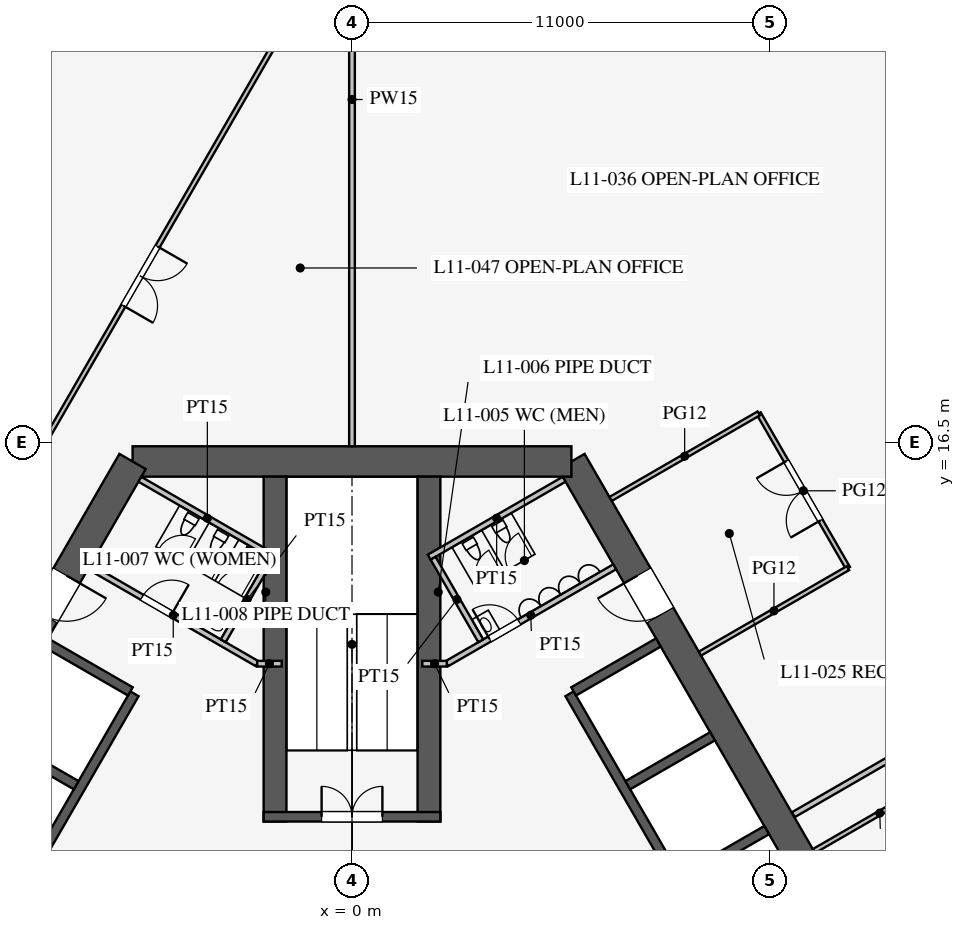
"""IFC4 building model, lengths in metres.
Left out: names, types, materials, properties, quantities, classifications, styles, units other than length and angle.
Written with IfcOpenShell. Run it as: python <this file> out.ifc"""

import sys

from ifc_helpers import new_model, si_unit, direction, frame, frame_2d, origin, place, context, subcontext, project, spatial, rectangle, extrude, element, fill, save


model = new_model("IFC4")
c1 = context("Model", 3, precision=1e-05, world=origin(), true_north=direction((0.0, 1.0)))
c2 = subcontext(c1, "Body", "Model", "MODEL_VIEW")
j1 = project(units=[si_unit("LENGTHUNIT", "METRE"), si_unit("PLANEANGLEUNIT", "RADIAN")], contexts=[c1])
p1 = place(None, origin())
s1 = spatial("IfcSite", under=j1, at=p1, CompositionType="ELEMENT")
p2 = place(p1, origin())
s2 = spatial("IfcBuilding", under=s1, at=p2, CompositionType="ELEMENT")
p3 = place(p2, frame((0.0, 0.0, 50.1)))
s3 = spatial("IfcBuildingStorey", under=s2, at=p3, CompositionType="ELEMENT", Elevation=50.1)
p4 = place(p3, frame((16.743, -3.0, 0.0), z_axis=(0.0, 0.0, 1.0), x_axis=(-0.500002442456, 0.866023993627, 0.0)))
e1 = element("IfcWall", 1, at=p4, inside=s3, PredefinedType="SHEAR", context=c2, shape_type="SweptSolid", body=[
    extrude(rectangle(XDim=21.939, YDim=0.8, at=frame_2d((10.97, 0.0))), origin(), (0.0, 0.0, 1.0), 4.2),
])
p5 = place(p4, frame((17.27, 0.0, 0.0)))
e2 = element("IfcOpeningElement", 2, at=p5, cuts=e1, PredefinedType="OPENING", context=c2, shape_type="SweptSolid", body=[
    extrude(rectangle(XDim=1.2, YDim=2.1, at=frame_2d((0.6, 1.05))), frame((0.0, 0.41, 0.0), z_axis=(0.0, -1.0, 0.0), x_axis=(1.0, 0.0, 0.0)), (0.0, 0.0, 1.0), 0.82),
])
p6 = place(p4, frame((3.47, 0.0, 0.0)))
e3 = element("IfcOpeningElement", 3, at=p6, cuts=e1, PredefinedType="OPENING", context=c2, shape_type="SweptSolid", body=[
    extrude(rectangle(XDim=1.2, YDim=2.1, at=frame_2d((0.6, 1.05))), frame((0.0, 0.41, 0.0), z_axis=(0.0, -1.0, 0.0), x_axis=(1.0, 0.0, 0.0)), (0.0, 0.0, 1.0), 0.82),
])
p7 = place(p3, frame((5.773, 16.0, 0.0), z_axis=(0.0, 0.0, 1.0), x_axis=(-1.0, 0.0, 0.0)))
e4 = element("IfcWall", 4, at=p7, inside=s3, PredefinedType="SHEAR", context=c2, shape_type="SweptSolid", body=[
    extrude(rectangle(XDim=11.547, YDim=0.8, at=frame_2d((5.773, 0.0))), origin(), (0.0, 0.0, 1.0), 4.2),
])
p8 = place(p3, frame((-5.773, 16.0, 0.0), z_axis=(0.0, 0.0, 1.0), x_axis=(-0.500002442456, -0.866023993627, 0.0)))
e5 = element("IfcWall", 5, at=p8, inside=s3, PredefinedType="SHEAR", context=c2, shape_type="SweptSolid", body=[
    extrude(rectangle(XDim=21.939, YDim=0.8, at=frame_2d((10.97, 0.0))), origin(), (0.0, 0.0, 1.0), 4.2),
])
p9 = place(p8, frame((17.27, 0.0, 0.0)))
e6 = element("IfcOpeningElement", 6, at=p9, cuts=e5, PredefinedType="OPENING", context=c2, shape_type="SweptSolid", body=[
    extrude(rectangle(XDim=1.2, YDim=2.1, at=frame_2d((0.6, 1.05))), frame((0.0, 0.41, 0.0), z_axis=(0.0, -1.0, 0.0), x_axis=(1.0, 0.0, 0.0)), (0.0, 0.0, 1.0), 0.82),
])
p10 = place(p8, frame((3.47, 0.0, 0.0)))
e7 = element("IfcOpeningElement", 7, at=p10, cuts=e5, PredefinedType="OPENING", context=c2, shape_type="SweptSolid", body=[
    extrude(rectangle(XDim=1.2, YDim=2.1, at=frame_2d((0.6, 1.05))), frame((0.0, 0.41, 0.0), z_axis=(0.0, -1.0, 0.0), x_axis=(1.0, 0.0, 0.0)), (0.0, 0.0, 1.0), 0.82),
])
p11 = place(p3, frame((11.424, 0.014, 0.0), z_axis=(0.0, 0.0, 1.0), x_axis=(-0.500001763848, 0.866024385424, 0.0)))
e8 = element("IfcWall", 8, at=p11, inside=s3, PredefinedType="SHEAR", context=c2, shape_type="SweptSolid", body=[
    extrude(rectangle(XDim=11.4, YDim=0.25, at=frame_2d((5.7, 0.0))), origin(), (0.0, 0.0, 1.0), 4.2),
])
for number, where, z_axis, x_axis in (
    (9, (8.682, 5.012, 0.0), (0.0, 0.0, 1.0), (0.866, 0.5, 0.0)),
    (10, (7.257, 7.481, 0.0), (0.0, 0.0, 1.0), (0.866, 0.5, 0.0)),
):
    element("IfcWall", number, at=place(p3, frame(where, z_axis=z_axis, x_axis=x_axis)), inside=s3, PredefinedType="SHEAR", context=c2, shape_type="SweptSolid", body=[
        extrude(rectangle(XDim=2.575, YDim=0.25, at=frame_2d((1.288, 0.0))), origin(), (0.0, 0.0, 1.0), 4.2),
    ])
p12 = place(p3, frame((5.832, 9.949, 0.0), z_axis=(0.0, 0.0, 1.0), x_axis=(0.866029291668, 0.499993265928, 0.0)))
e11 = element("IfcWall", 11, at=p12, inside=s3, PredefinedType="SHEAR", context=c2, shape_type="SweptSolid", body=[
    extrude(rectangle(XDim=2.575, YDim=0.25, at=frame_2d((1.288, 0.0))), origin(), (0.0, 0.0, 1.0), 4.2),
])
p13 = place(p3, frame((-5.724, 9.886, 0.0), z_axis=(0.0, 0.0, 1.0), x_axis=(-0.500001763848, -0.866024385424, 0.0)))
e12 = element("IfcWall", 12, at=p13, inside=s3, PredefinedType="SHEAR", context=c2, shape_type="SweptSolid", body=[
    extrude(rectangle(XDim=11.4, YDim=0.25, at=frame_2d((5.7, 0.0))), origin(), (0.0, 0.0, 1.0), 4.2),
])
p14 = place(p13, frame((6.525, 0.0, 0.0)))
e13 = element("IfcOpeningElement", 13, at=p14, cuts=e12, PredefinedType="OPENING", context=c2, shape_type="SweptSolid", body=[
    extrude(rectangle(XDim=1.2, YDim=2.2, at=frame_2d((0.6, 1.1))), frame((0.0, 0.135, 0.0), z_axis=(0.0, -1.0, 0.0), x_axis=(1.0, 0.0, 0.0)), (0.0, 0.0, 1.0), 0.27),
])
p15 = place(p13, frame((9.375, 0.0, 0.0)))
e14 = element("IfcOpeningElement", 14, at=p15, cuts=e12, PredefinedType="OPENING", context=c2, shape_type="SweptSolid", body=[
    extrude(rectangle(XDim=1.2, YDim=2.2, at=frame_2d((0.6, 1.1))), frame((0.0, 0.135, 0.0), z_axis=(0.0, -1.0, 0.0), x_axis=(1.0, 0.0, 0.0)), (0.0, 0.0, 1.0), 0.27),
])
p16 = place(p3, frame((-5.832, 9.949, 0.0), z_axis=(0.0, 0.0, 1.0), x_axis=(-0.866029291668, 0.499993265928, 0.0)))
e15 = element("IfcWall", 15, at=p16, inside=s3, PredefinedType="SHEAR", context=c2, shape_type="SweptSolid", body=[
    extrude(rectangle(XDim=2.575, YDim=0.25, at=frame_2d((1.288, 0.0))), origin(), (0.0, 0.0, 1.0), 4.2),
])
p17 = place(p3, frame((-7.257, 7.481, 0.0), z_axis=(0.0, 0.0, 1.0), x_axis=(-0.866046643894, 0.499963209246, 0.0)))
e16 = element("IfcWall", 16, at=p17, inside=s3, PredefinedType="SHEAR", context=c2, shape_type="SweptSolid", body=[
    extrude(rectangle(XDim=2.575, YDim=0.25, at=frame_2d((1.288, 0.0))), origin(), (0.0, 0.0, 1.0), 4.2),
])
for number, where, z_axis, x_axis in (
    (17, (2.025, 6.525, 0.0), (0.0, 0.0, 1.0), (0.0, 1.0, 0.0)),
    (18, (-2.025, 6.525, 0.0), (0.0, 0.0, 1.0), (0.0, 1.0, 0.0)),
):
    element("IfcWall", number, at=place(p3, frame(where, z_axis=z_axis, x_axis=x_axis)), inside=s3, PredefinedType="SHEAR", context=c2, shape_type="SweptSolid", body=[
        extrude(rectangle(XDim=9.075, YDim=0.6, at=frame_2d((4.538, 0.0))), origin(), (0.0, 0.0, 1.0), 4.2),
    ])
p18 = place(p3, frame((2.325, 6.65, 0.0), z_axis=(0.0, 0.0, 1.0), x_axis=(-1.0, 0.0, 0.0)))
e19 = element("IfcWall", 19, at=p18, inside=s3, PredefinedType="SHEAR", context=c2, shape_type="SweptSolid", body=[
    extrude(rectangle(XDim=4.65, YDim=0.25, at=frame_2d((2.325, 0.0))), origin(), (0.0, 0.0, 1.0), 4.2),
])
p19 = place(p18, frame((1.525, 0.0, 0.0)))
e20 = element("IfcOpeningElement", 20, at=p19, cuts=e19, PredefinedType="OPENING", context=c2, shape_type="SweptSolid", body=[
    extrude(rectangle(XDim=1.6, YDim=2.1, at=frame_2d((0.8, 1.05))), frame((0.0, 0.135, 0.0), z_axis=(0.0, -1.0, 0.0), x_axis=(1.0, 0.0, 0.0)), (0.0, 0.0, 1.0), 0.27),
])
p20 = place(p3, frame((2.495, 10.678, 0.0), z_axis=(0.0, 0.0, 1.0), x_axis=(0.86602216432, 0.500005610874, 0.0)))
e21 = element("IfcWall", 21, at=p20, inside=s3, PredefinedType="PARTITIONING", context=c2, shape_type="SweptSolid", body=[
    extrude(rectangle(XDim=5.1, YDim=0.15, at=frame_2d((2.55, 0.0))), origin(), (0.0, 0.0, 1.0), 4.0),
])
p21 = place(p20, frame((1.3, 0.0, 0.0)))
e22 = element("IfcOpeningElement", 22, at=p21, cuts=e21, PredefinedType="OPENING", context=c2, shape_type="SweptSolid", body=[
    extrude(rectangle(XDim=0.9, YDim=2.1, at=frame_2d((0.45, 1.05))), frame((0.0, 0.085, 0.0), z_axis=(0.0, -1.0, 0.0), x_axis=(1.0, 0.0, 0.0)), (0.0, 0.0, 1.0), 0.17),
])
p22 = place(p3, frame((-2.495, 10.678, 0.0), z_axis=(0.0, 0.0, 1.0), x_axis=(-0.86602216432, 0.500005610874, 0.0)))
e23 = element("IfcWall", 23, at=p22, inside=s3, PredefinedType="PARTITIONING", context=c2, shape_type="SweptSolid", body=[
    extrude(rectangle(XDim=5.1, YDim=0.15, at=frame_2d((2.55, 0.0))), origin(), (0.0, 0.0, 1.0), 4.0),
])
p23 = place(p22, frame((2.6, 0.0, 0.0)))
e24 = element("IfcOpeningElement", 24, at=p23, cuts=e23, PredefinedType="OPENING", context=c2, shape_type="SweptSolid", body=[
    extrude(rectangle(XDim=0.9, YDim=2.1, at=frame_2d((0.45, 1.05))), frame((0.0, 0.085, 0.0), z_axis=(0.0, -1.0, 0.0), x_axis=(1.0, 0.0, 0.0)), (0.0, 0.0, 1.0), 0.17),
])
for number, where, z_axis, x_axis in (
    (25, (2.495, 10.678, 0.0), (0.0, 0.0, 1.0), (-1.0, 0.0, 0.0)),
    (26, (-2.495, 10.678, 0.0), (0.0, 0.0, 1.0), (1.0, 0.0, 0.0)),
):
    element("IfcWall", number, at=place(p3, frame(where, z_axis=z_axis, x_axis=x_axis)), inside=s3, PredefinedType="PARTITIONING", context=c2, shape_type="SweptSolid", body=[
        extrude(rectangle(XDim=0.645, YDim=0.15, at=frame_2d((0.323, 0.0))), origin(), (0.0, 0.0, 1.0), 4.0),
    ])
p24 = place(p3, frame((2.031, 13.482, 0.0), z_axis=(0.0, 0.0, 1.0), x_axis=(0.866050731258, 0.499956128963, 0.0)))
e27 = element("IfcWall", 27, at=p24, inside=s3, PredefinedType="PARTITIONING", context=c2, shape_type="SweptSolid", body=[
    extrude(rectangle(XDim=4.1, YDim=0.15, at=frame_2d((2.05, 0.0))), origin(), (0.0, 0.0, 1.0), 4.0),
])
p25 = place(p3, frame((3.389, 11.281, 0.0), z_axis=(0.0, 0.0, 1.0), x_axis=(-0.499989096993, 0.866031698547, 0.0)))
e28 = element("IfcWall", 28, at=p25, inside=s3, PredefinedType="PARTITIONING", context=c2, shape_type="SweptSolid", body=[
    extrude(rectangle(XDim=2.51, YDim=0.15, at=frame_2d((1.255, 0.0))), origin(), (0.0, 0.0, 1.0), 4.0),
])
p26 = place(p3, frame((-2.031, 13.482, 0.0), z_axis=(0.0, 0.0, 1.0), x_axis=(-0.866050731258, 0.499956128963, 0.0)))
e29 = element("IfcWall", 29, at=p26, inside=s3, PredefinedType="PARTITIONING", context=c2, shape_type="SweptSolid", body=[
    extrude(rectangle(XDim=4.1, YDim=0.15, at=frame_2d((2.05, 0.0))), origin(), (0.0, 0.0, 1.0), 4.0),
])
p27 = place(p3, frame((-3.389, 11.281, 0.0), z_axis=(0.0, 0.0, 1.0), x_axis=(0.499989096993, 0.866031698547, 0.0)))
e30 = element("IfcWall", 30, at=p27, inside=s3, PredefinedType="PARTITIONING", context=c2, shape_type="SweptSolid", body=[
    extrude(rectangle(XDim=2.51, YDim=0.15, at=frame_2d((1.255, 0.0))), origin(), (0.0, 0.0, 1.0), 4.0),
])
p28 = place(p3, frame((0.0, 16.4, 0.0), z_axis=(0.0, 0.0, 1.0), x_axis=(0.0, 1.0, 0.0)))
e31 = element("IfcWall", 31, at=p28, inside=s3, PredefinedType="PARTITIONING", context=c2, shape_type="SweptSolid", body=[
    extrude(rectangle(XDim=18.25, YDim=0.15, at=frame_2d((9.125, 0.0))), origin(), (0.0, 0.0, 1.0), 2.3),
])
p29 = place(p3, frame((11.613, 6.705, 0.0), z_axis=(0.0, 0.0, 1.0), x_axis=(0.86602785495, 0.499995754432, 0.0)))
e32 = element("IfcWall", 32, at=p29, inside=s3, PredefinedType="PARTITIONING", context=c2, shape_type="SweptSolid", body=[
    extrude(rectangle(XDim=12.759, YDim=0.15, at=frame_2d((6.379, 0.0))), origin(), (0.0, 0.0, 1.0), 3.2),
])
p30 = place(p3, frame((13.052, 13.194, 0.0), z_axis=(0.0, 0.0, 1.0), x_axis=(-0.499977259774, 0.866038532462, 0.0)))
e33 = element("IfcWall", 33, at=p30, inside=s3, PredefinedType="PARTITIONING", context=c2, shape_type="SweptSolid", body=[
    extrude(rectangle(XDim=4.7, YDim=0.12, at=frame_2d((2.35, 0.0))), origin(), (0.0, 0.0, 1.0), 2.9),
])
p31 = place(p30, frame((1.45, 0.0, 0.15)))
e34 = element("IfcOpeningElement", 34, at=p31, cuts=e33, PredefinedType="OPENING", context=c2, shape_type="SweptSolid", body=[
    extrude(rectangle(XDim=1.8, YDim=2.1, at=frame_2d((0.9, 1.05))), frame((0.0, 0.07, 0.0), z_axis=(0.0, -1.0, 0.0), x_axis=(1.0, 0.0, 0.0)), (0.0, 0.0, 1.0), 0.14),
])
p32 = place(p3, frame((9.155, 10.944, 0.0), z_axis=(0.0, 0.0, 1.0), x_axis=(0.866017533419, 0.500013631625, 0.0)))
e35 = element("IfcWall", 35, at=p32, inside=s3, PredefinedType="PARTITIONING", context=c2, shape_type="SweptSolid", body=[
    extrude(rectangle(XDim=4.5, YDim=0.12, at=frame_2d((2.25, 0.0))), origin(), (0.0, 0.0, 1.0), 2.9),
])
p33 = place(p3, frame((6.805, 15.014, 0.0), z_axis=(0.0, 0.0, 1.0), x_axis=(0.866031096941, 0.499990139034, 0.0)))
e36 = element("IfcWall", 36, at=p33, inside=s3, PredefinedType="PARTITIONING", context=c2, shape_type="SweptSolid", body=[
    extrude(rectangle(XDim=4.5, YDim=0.12, at=frame_2d((2.25, 0.0))), origin(), (0.0, 0.0, 1.0), 2.9),
])
p34 = place(p3, frame((12.155, 5.747, 0.0), z_axis=(0.0, 0.0, 1.0), x_axis=(0.866026010844, 0.49999894854, 0.0)))
e37 = element("IfcWall", 37, at=p34, inside=s3, PredefinedType="PARTITIONING", context=c2, shape_type="SweptSolid", body=[
    extrude(rectangle(XDim=4.0, YDim=0.12, at=frame_2d((2.0, 0.0))), origin(), (0.0, 0.0, 1.0), 2.9),
])
p35 = place(p3, frame((-0.016, 30.491, 0.0), z_axis=(0.0, 0.0, 1.0), x_axis=(-0.50000091641, -0.866024874695, 0.0)))
e38 = element("IfcWall", 38, at=p35, inside=s3, PredefinedType="PARTITIONING", context=c2, shape_type="SweptSolid", body=[
    extrude(rectangle(XDim=52.796, YDim=0.12, at=frame_2d((26.398, 0.0))), origin(), (0.0, 0.0, 1.0), 2.9),
])
p36 = place(p35, frame((10.2, 0.0, 0.15)))
e39 = element("IfcOpeningElement", 39, at=p36, cuts=e38, PredefinedType="OPENING", context=c2, shape_type="SweptSolid", body=[
    extrude(rectangle(XDim=1.8, YDim=2.1, at=frame_2d((0.9, 1.05))), frame((0.0, 0.07, 0.0), z_axis=(0.0, -1.0, 0.0), x_axis=(1.0, 0.0, 0.0)), (0.0, 0.0, 1.0), 0.14),
])
p37 = place(p35, frame((40.8, 0.0, 0.15)))
e40 = element("IfcOpeningElement", 40, at=p37, cuts=e38, PredefinedType="OPENING", context=c2, shape_type="SweptSolid", body=[
    extrude(rectangle(XDim=1.8, YDim=2.1, at=frame_2d((0.9, 1.05))), frame((0.0, 0.07, 0.0), z_axis=(0.0, -1.0, 0.0), x_axis=(1.0, 0.0, 0.0)), (0.0, 0.0, 1.0), 0.14),
])
p38 = place(p21, origin())
e41 = element("IfcDoor", 41, at=p38, inside=s3, OperationType="SINGLE_SWING_LEFT", PredefinedType="DOOR", context=c2, shape_type="SweptSolid", body=[
    extrude(rectangle(XDim=0.9, YDim=2.1, at=frame_2d((0.45, 1.05))), frame((0.0, 0.025, 0.0), z_axis=(0.0, -1.0, 0.0), x_axis=(1.0, 0.0, 0.0)), (0.0, 0.0, 1.0), 0.05),
])
fill(e22, e41)
p39 = place(p23, frame((0.9, 0.0, 0.0), z_axis=(0.0, 0.0, 1.0), x_axis=(-1.0, 0.0, 0.0)))
e42 = element("IfcDoor", 42, at=p39, inside=s3, OperationType="SINGLE_SWING_RIGHT", PredefinedType="DOOR", context=c2, shape_type="SweptSolid", body=[
    extrude(rectangle(XDim=0.9, YDim=2.1, at=frame_2d((0.45, 1.05))), frame((0.0, 0.025, 0.0), z_axis=(0.0, -1.0, 0.0), x_axis=(1.0, 0.0, 0.0)), (0.0, 0.0, 1.0), 0.05),
])
fill(e24, e42)
p40 = place(p19, frame((1.6, 0.0, 0.0), z_axis=(0.0, 0.0, 1.0), x_axis=(-1.0, 0.0, 0.0)))
e43 = element("IfcDoor", 43, at=p40, inside=s3, OperationType="DOUBLE_DOOR_SINGLE_SWING", PredefinedType="DOOR", context=c2, shape_type="SweptSolid", body=[
    extrude(rectangle(XDim=1.6, YDim=2.1, at=frame_2d((0.8, 1.05))), frame((0.0, 0.025, 0.0), z_axis=(0.0, -1.0, 0.0), x_axis=(1.0, 0.0, 0.0)), (0.0, 0.0, 1.0), 0.05),
])
fill(e20, e43)
p41 = place(p5, origin())
e44 = element("IfcDoor", 44, at=p41, inside=s3, OperationType="SINGLE_SWING_RIGHT", PredefinedType="DOOR", context=c2, shape_type="SweptSolid", body=[
    extrude(rectangle(XDim=1.2, YDim=2.1, at=frame_2d((0.6, 1.05))), frame((0.0, 0.025, 0.0), z_axis=(0.0, -1.0, 0.0), x_axis=(1.0, 0.0, 0.0)), (0.0, 0.0, 1.0), 0.05),
])
fill(e2, e44)
p42 = place(p10, origin())
e45 = element("IfcDoor", 45, at=p42, inside=s3, OperationType="SINGLE_SWING_LEFT", PredefinedType="DOOR", context=c2, shape_type="SweptSolid", body=[
    extrude(rectangle(XDim=1.2, YDim=2.1, at=frame_2d((0.6, 1.05))), frame((0.0, 0.025, 0.0), z_axis=(0.0, -1.0, 0.0), x_axis=(1.0, 0.0, 0.0)), (0.0, 0.0, 1.0), 0.05),
])
fill(e7, e45)
p43 = place(p31, origin())
e46 = element("IfcDoor", 46, at=p43, inside=s3, OperationType="DOUBLE_DOOR_SINGLE_SWING", PredefinedType="DOOR", context=c2, shape_type="SweptSolid", body=[
    extrude(rectangle(XDim=1.8, YDim=2.1, at=frame_2d((0.9, 1.05))), frame((0.0, 0.025, 0.0), z_axis=(0.0, -1.0, 0.0), x_axis=(1.0, 0.0, 0.0)), (0.0, 0.0, 1.0), 0.05),
])
fill(e34, e46)
p44 = place(p36, origin())
e47 = element("IfcDoor", 47, at=p44, inside=s3, OperationType="DOUBLE_DOOR_SINGLE_SWING", PredefinedType="DOOR", context=c2, shape_type="SweptSolid", body=[
    extrude(rectangle(XDim=1.8, YDim=2.1, at=frame_2d((0.9, 1.05))), frame((0.0, 0.025, 0.0), z_axis=(0.0, -1.0, 0.0), x_axis=(1.0, 0.0, 0.0)), (0.0, 0.0, 1.0), 0.05),
])
fill(e39, e47)
save(model, sys.argv[1])
